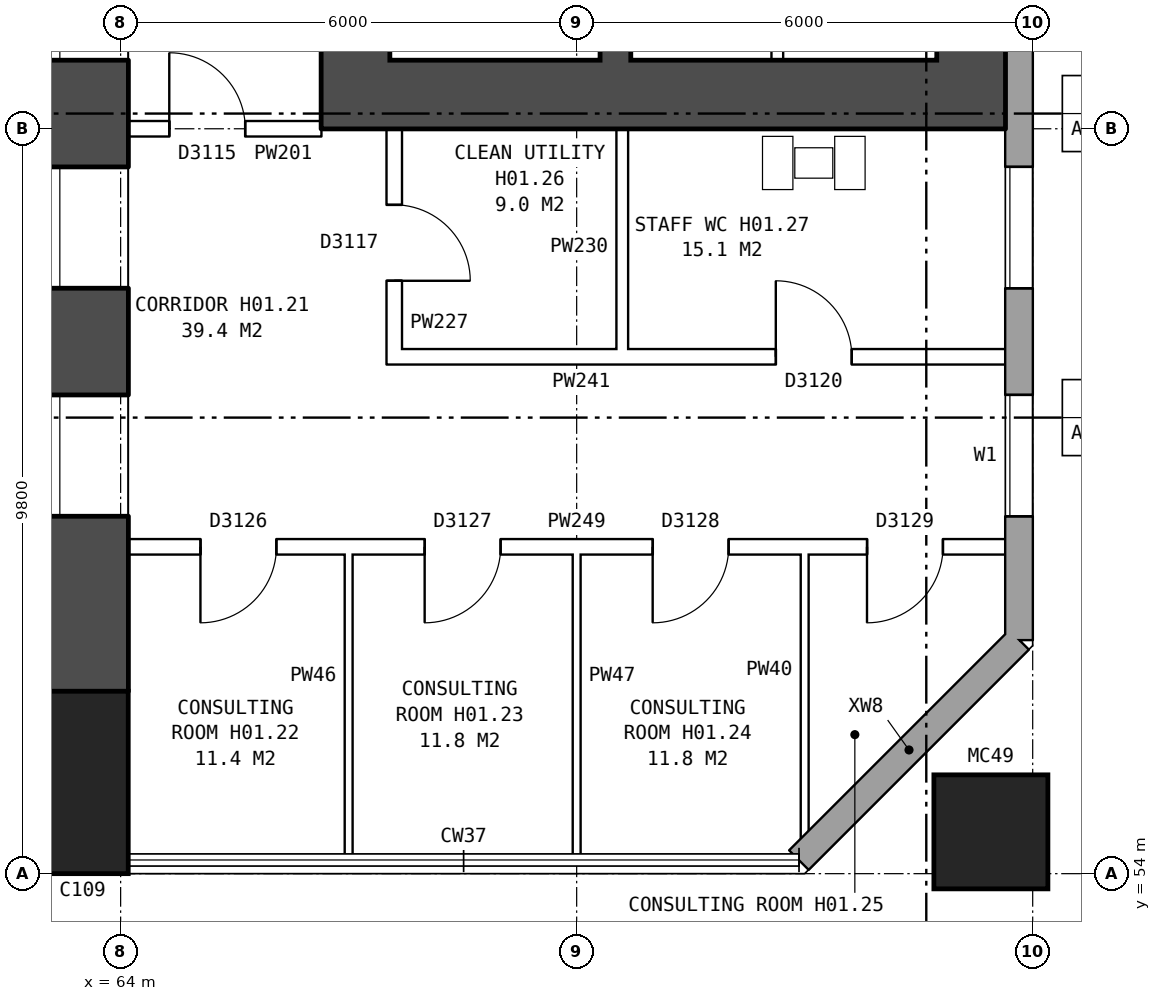
"""IFC4 building model, lengths in metres.
Left out: names, types, materials, properties, quantities, classifications, styles, units other than length and angle.
Written with IfcOpenShell. Run it as: python <this file> out.ifc"""

import sys

from ifc_helpers import new_model, si_unit, direction, frame, frame_2d, origin, origin_2d, place, context, subcontext, project, spatial, rectangle, hollow_rectangle, extrude, element, fill, save


model = new_model("IFC4")
c1 = context("Model", 3, precision=1e-05, world=origin(), true_north=direction((0.0, 1.0)))
c2 = subcontext(c1, "Body", "Model", "MODEL_VIEW")
j1 = project(units=[si_unit("LENGTHUNIT", "METRE"), si_unit("PLANEANGLEUNIT", "RADIAN")], contexts=[c1])
p1 = place(None, origin())
s1 = spatial("IfcSite", under=j1, at=p1, CompositionType="ELEMENT")
p2 = place(p1, origin())
s2 = spatial("IfcBuilding", under=s1, at=p2, CompositionType="ELEMENT")
p3 = place(p2, frame((0.0, 0.0, 5.5)))
s3 = spatial("IfcBuildingStorey", under=s2, at=p3, CompositionType="ELEMENT", Elevation=5.5)
p4 = place(p3, frame((63.5, 55.2, -0.3), z_axis=(0.0, 0.0, 1.0), x_axis=(1.0, 0.0, 0.0)))
e1 = element("IfcColumn", 1, at=p4, inside=s3, PredefinedType="COLUMN", context=c2, shape_type="SweptSolid", body=[
    extrude(rectangle(XDim=1.2, YDim=2.4, at=origin_2d()), origin(), (0.0, 0.0, 1.0), 4.6),
])
p5 = place(p3, frame((63.5, 56.4, -0.3), z_axis=(0.0, 0.0, 1.0), x_axis=(0.0, 1.0, 0.0)))
e2 = element("IfcWall", 2, at=p5, inside=s3, PredefinedType="SHEAR", context=c2, shape_type="SweptSolid", body=[
    extrude(rectangle(XDim=27.2, YDim=1.2, at=frame_2d((13.6, 0.0))), origin(), (0.0, 0.0, 1.0), 4.6),
])
p6 = place(p5, frame((2.3, 0.0, 0.8)))
e3 = element("IfcOpeningElement", 3, at=p6, cuts=e2, PredefinedType="OPENING", context=c2, shape_type="SweptSolid", body=[
    extrude(rectangle(XDim=1.6, YDim=1.8, at=frame_2d((0.8, 0.9))), frame((0.0, 0.61, 0.0), z_axis=(0.0, -1.0, 0.0), x_axis=(1.0, 0.0, 0.0)), (0.0, 0.0, 1.0), 1.22),
])
p7 = place(p5, frame((5.3, 0.0, 0.8)))
e4 = element("IfcOpeningElement", 4, at=p7, cuts=e2, PredefinedType="OPENING", context=c2, shape_type="SweptSolid", body=[
    extrude(rectangle(XDim=1.6, YDim=1.8, at=frame_2d((0.8, 0.9))), frame((0.0, 0.61, 0.0), z_axis=(0.0, -1.0, 0.0), x_axis=(1.0, 0.0, 0.0)), (0.0, 0.0, 1.0), 1.22),
])
p8 = place(p5, frame((8.3, 0.0, 0.8)))
e5 = element("IfcOpeningElement", 5, at=p8, cuts=e2, PredefinedType="OPENING", context=c2, shape_type="SweptSolid", body=[
    extrude(rectangle(XDim=1.6, YDim=1.8, at=frame_2d((0.8, 0.9))), frame((0.0, 0.61, 0.0), z_axis=(0.0, -1.0, 0.0), x_axis=(1.0, 0.0, 0.0)), (0.0, 0.0, 1.0), 1.22),
])
p9 = place(p5, frame((11.3, 0.0, 0.8)))
e6 = element("IfcOpeningElement", 6, at=p9, cuts=e2, PredefinedType="OPENING", context=c2, shape_type="SweptSolid", body=[
    extrude(rectangle(XDim=1.6, YDim=1.8, at=frame_2d((0.8, 0.9))), frame((0.0, 0.61, 0.0), z_axis=(0.0, -1.0, 0.0), x_axis=(1.0, 0.0, 0.0)), (0.0, 0.0, 1.0), 1.22),
])
p10 = place(p5, frame((14.3, 0.0, 0.8)))
e7 = element("IfcOpeningElement", 7, at=p10, cuts=e2, PredefinedType="OPENING", context=c2, shape_type="SweptSolid", body=[
    extrude(rectangle(XDim=1.6, YDim=1.8, at=frame_2d((0.8, 0.9))), frame((0.0, 0.61, 0.0), z_axis=(0.0, -1.0, 0.0), x_axis=(1.0, 0.0, 0.0)), (0.0, 0.0, 1.0), 1.22),
])
p11 = place(p5, frame((17.3, 0.0, 0.8)))
e8 = element("IfcOpeningElement", 8, at=p11, cuts=e2, PredefinedType="OPENING", context=c2, shape_type="SweptSolid", body=[
    extrude(rectangle(XDim=1.6, YDim=1.8, at=frame_2d((0.8, 0.9))), frame((0.0, 0.61, 0.0), z_axis=(0.0, -1.0, 0.0), x_axis=(1.0, 0.0, 0.0)), (0.0, 0.0, 1.0), 1.22),
])
p12 = place(p5, frame((20.3, 0.0, 0.8)))
e9 = element("IfcOpeningElement", 9, at=p12, cuts=e2, PredefinedType="OPENING", context=c2, shape_type="SweptSolid", body=[
    extrude(rectangle(XDim=1.6, YDim=1.8, at=frame_2d((0.8, 0.9))), frame((0.0, 0.61, 0.0), z_axis=(0.0, -1.0, 0.0), x_axis=(1.0, 0.0, 0.0)), (0.0, 0.0, 1.0), 1.22),
])
p13 = place(p5, frame((23.3, 0.0, 0.8)))
e10 = element("IfcOpeningElement", 10, at=p13, cuts=e2, PredefinedType="OPENING", context=c2, shape_type="SweptSolid", body=[
    extrude(rectangle(XDim=1.6, YDim=1.8, at=frame_2d((0.8, 0.9))), frame((0.0, 0.61, 0.0), z_axis=(0.0, -1.0, 0.0), x_axis=(1.0, 0.0, 0.0)), (0.0, 0.0, 1.0), 1.22),
])
p14 = place(p3, frame((75.45, 54.55, 0.0), z_axis=(0.0, 0.0, 1.0), x_axis=(1.0, 0.0, 0.0)))
e11 = element("IfcColumn", 11, at=p14, inside=s3, PredefinedType="COLUMN", context=c2, shape_type="SweptSolid", body=[
    extrude(hollow_rectangle(XDim=1.5, YDim=1.5, WallThickness=0.08, at=origin_2d()), origin(), (0.0, 0.0, 1.0), 4.6),
])
p15 = place(p3, frame((72.925, 54.18, 0.0), z_axis=(0.0, 0.0, 1.0), x_axis=(0.707106781187, 0.707106781187, 0.0)))
e12 = element("IfcWall", 12, at=p15, inside=s3, PredefinedType="STANDARD", context=c2, shape_type="SweptSolid", body=[
    extrude(rectangle(XDim=4.094, YDim=0.36, at=frame_2d((2.047, 0.0))), origin(), (0.0, 0.0, 1.0), 4.3),
])
p16 = place(p3, frame((75.82, 57.075, 0.0), z_axis=(0.0, 0.0, 1.0), x_axis=(0.0, 1.0, 0.0)))
e13 = element("IfcWall", 13, at=p16, inside=s3, PredefinedType="STANDARD", context=c2, shape_type="SweptSolid", body=[
    extrude(rectangle(XDim=25.851, YDim=0.36, at=frame_2d((12.925, 0.0))), origin(), (0.0, 0.0, 1.0), 4.3),
])
p17 = place(p16, frame((1.625, 0.0, 0.8)))
e14 = element("IfcOpeningElement", 14, at=p17, cuts=e13, PredefinedType="OPENING", context=c2, shape_type="SweptSolid", body=[
    extrude(rectangle(XDim=1.6, YDim=1.8, at=frame_2d((0.8, 0.9))), frame((0.0, 0.19, 0.0), z_axis=(0.0, -1.0, 0.0), x_axis=(1.0, 0.0, 0.0)), (0.0, 0.0, 1.0), 0.38),
])
p18 = place(p16, frame((4.625, 0.0, 0.8)))
e15 = element("IfcOpeningElement", 15, at=p18, cuts=e13, PredefinedType="OPENING", context=c2, shape_type="SweptSolid", body=[
    extrude(rectangle(XDim=1.6, YDim=1.8, at=frame_2d((0.8, 0.9))), frame((0.0, 0.19, 0.0), z_axis=(0.0, -1.0, 0.0), x_axis=(1.0, 0.0, 0.0)), (0.0, 0.0, 1.0), 0.38),
])
p19 = place(p16, frame((19.625, 0.0, 0.8)))
e16 = element("IfcOpeningElement", 16, at=p19, cuts=e13, PredefinedType="OPENING", context=c2, shape_type="SweptSolid", body=[
    extrude(rectangle(XDim=1.6, YDim=1.8, at=frame_2d((0.8, 0.9))), frame((0.0, 0.19, 0.0), z_axis=(0.0, -1.0, 0.0), x_axis=(1.0, 0.0, 0.0)), (0.0, 0.0, 1.0), 0.38),
])
p20 = place(p16, frame((22.625, 0.0, 0.8)))
e17 = element("IfcOpeningElement", 17, at=p20, cuts=e13, PredefinedType="OPENING", context=c2, shape_type="SweptSolid", body=[
    extrude(rectangle(XDim=1.6, YDim=1.8, at=frame_2d((0.8, 0.9))), frame((0.0, 0.19, 0.0), z_axis=(0.0, -1.0, 0.0), x_axis=(1.0, 0.0, 0.0)), (0.0, 0.0, 1.0), 0.38),
])
p21 = place(p3, frame((67.09, 64.7, 0.0), z_axis=(0.0, 0.0, 1.0), x_axis=(0.0, 1.0, 0.0)))
e18 = element("IfcWall", 18, at=p21, inside=s3, PredefinedType="SHEAR", context=c2, shape_type="SweptSolid", body=[
    extrude(rectangle(XDim=10.6, YDim=0.9, at=frame_2d((5.3, 0.0))), origin(), (0.0, 0.0, 1.0), 4.3),
])
p22 = place(p21, frame((0.425, 0.0, 0.0)))
e19 = element("IfcOpeningElement", 19, at=p22, cuts=e18, PredefinedType="OPENING", context=c2, shape_type="SweptSolid", body=[
    extrude(rectangle(XDim=1.1, YDim=2.1, at=frame_2d((0.55, 1.05))), frame((0.0, 0.46, 0.0), z_axis=(0.0, -1.0, 0.0), x_axis=(1.0, 0.0, 0.0)), (0.0, 0.0, 1.0), 0.92),
])
p23 = place(p21, frame((9.0, 0.0, 0.0)))
e20 = element("IfcOpeningElement", 20, at=p23, cuts=e18, PredefinedType="OPENING", context=c2, shape_type="SweptSolid", body=[
    extrude(rectangle(XDim=1.1, YDim=2.1, at=frame_2d((0.55, 1.05))), frame((0.0, 0.46, 0.0), z_axis=(0.0, -1.0, 0.0), x_axis=(1.0, 0.0, 0.0)), (0.0, 0.0, 1.0), 0.92),
])
p24 = place(p3, frame((75.19, 64.7, 0.0), z_axis=(0.0, 0.0, 1.0), x_axis=(0.0, 1.0, 0.0)))
e21 = element("IfcWall", 21, at=p24, inside=s3, PredefinedType="SHEAR", context=c2, shape_type="SweptSolid", body=[
    extrude(rectangle(XDim=10.6, YDim=0.9, at=frame_2d((5.3, 0.0))), origin(), (0.0, 0.0, 1.0), 4.3),
])
p25 = place(p3, frame((66.64, 64.25, 0.0), z_axis=(0.0, 0.0, 1.0), x_axis=(1.0, 0.0, 0.0)))
e22 = element("IfcWall", 22, at=p25, inside=s3, PredefinedType="SHEAR", context=c2, shape_type="SweptSolid", body=[
    extrude(rectangle(XDim=9.0, YDim=0.9, at=frame_2d((4.5, 0.0))), origin(), (0.0, 0.0, 1.0), 4.3),
])
p26 = place(p3, frame((70.51, 64.7, 0.0), z_axis=(0.0, 0.0, 1.0), x_axis=(0.0, 1.0, 0.0)))
e23 = element("IfcWall", 23, at=p26, inside=s3, PredefinedType="SHEAR", context=c2, shape_type="SweptSolid", body=[
    extrude(rectangle(XDim=1.95, YDim=0.4, at=frame_2d((0.975, 0.0))), origin(), (0.0, 0.0, 1.0), 4.3),
])
p27 = place(p3, frame((72.64, 64.7, 0.0), z_axis=(0.0, 0.0, 1.0), x_axis=(0.0, 1.0, 0.0)))
e24 = element("IfcWall", 24, at=p27, inside=s3, PredefinedType="PARTITIONING", context=c2, shape_type="SweptSolid", body=[
    extrude(rectangle(XDim=1.45, YDim=0.15, at=frame_2d((0.725, 0.0))), origin(), (0.0, 0.0, 1.0), 4.3),
])
p28 = place(p27, frame((0.3, 0.0, 0.0)))
e25 = element("IfcOpeningElement", 25, at=p28, cuts=e24, PredefinedType="OPENING", context=c2, shape_type="SweptSolid", body=[
    extrude(rectangle(XDim=0.85, YDim=2.1, at=frame_2d((0.425, 1.05))), frame((0.0, 0.085, 0.0), z_axis=(0.0, -1.0, 0.0), x_axis=(1.0, 0.0, 0.0)), (0.0, 0.0, 1.0), 0.17),
])
p29 = place(p3, frame((63.98, 58.3, 0.0), z_axis=(0.0, 0.0, 1.0), x_axis=(1.0, 0.0, 0.0)))
e26 = element("IfcWall", 26, at=p29, inside=s3, PredefinedType="PARTITIONING", context=c2, shape_type="SweptSolid", body=[
    extrude(rectangle(XDim=11.78, YDim=0.2, at=frame_2d((5.89, 0.0))), origin(), (0.0, 0.0, 1.0), 4.3),
])
p30 = place(p29, frame((1.07, 0.0, 0.0)))
e27 = element("IfcOpeningElement", 27, at=p30, cuts=e26, PredefinedType="OPENING", context=c2, shape_type="SweptSolid", body=[
    extrude(rectangle(XDim=1.0, YDim=2.1, at=frame_2d((0.5, 1.05))), frame((0.0, 0.11, 0.0), z_axis=(0.0, -1.0, 0.0), x_axis=(1.0, 0.0, 0.0)), (0.0, 0.0, 1.0), 0.22),
])
p31 = place(p29, frame((4.02, 0.0, 0.0)))
e28 = element("IfcOpeningElement", 28, at=p31, cuts=e26, PredefinedType="OPENING", context=c2, shape_type="SweptSolid", body=[
    extrude(rectangle(XDim=1.0, YDim=2.1, at=frame_2d((0.5, 1.05))), frame((0.0, 0.11, 0.0), z_axis=(0.0, -1.0, 0.0), x_axis=(1.0, 0.0, 0.0)), (0.0, 0.0, 1.0), 0.22),
])
p32 = place(p29, frame((7.02, 0.0, 0.0)))
e29 = element("IfcOpeningElement", 29, at=p32, cuts=e26, PredefinedType="OPENING", context=c2, shape_type="SweptSolid", body=[
    extrude(rectangle(XDim=1.0, YDim=2.1, at=frame_2d((0.5, 1.05))), frame((0.0, 0.11, 0.0), z_axis=(0.0, -1.0, 0.0), x_axis=(1.0, 0.0, 0.0)), (0.0, 0.0, 1.0), 0.22),
])
p33 = place(p29, frame((9.84, 0.0, 0.0)))
e30 = element("IfcOpeningElement", 30, at=p33, cuts=e26, PredefinedType="OPENING", context=c2, shape_type="SweptSolid", body=[
    extrude(rectangle(XDim=1.0, YDim=2.1, at=frame_2d((0.5, 1.05))), frame((0.0, 0.11, 0.0), z_axis=(0.0, -1.0, 0.0), x_axis=(1.0, 0.0, 0.0)), (0.0, 0.0, 1.0), 0.22),
])
p34 = place(p3, frame((67.5, 60.8, 0.0), z_axis=(0.0, 0.0, 1.0), x_axis=(1.0, 0.0, 0.0)))
e31 = element("IfcWall", 31, at=p34, inside=s3, PredefinedType="PARTITIONING", context=c2, shape_type="SweptSolid", body=[
    extrude(rectangle(XDim=8.26, YDim=0.2, at=frame_2d((4.13, 0.0))), origin(), (0.0, 0.0, 1.0), 4.3),
])
p35 = place(p34, frame((5.12, 0.0, 0.0)))
e32 = element("IfcOpeningElement", 32, at=p35, cuts=e31, PredefinedType="OPENING", context=c2, shape_type="SweptSolid", body=[
    extrude(rectangle(XDim=1.0, YDim=2.1, at=frame_2d((0.5, 1.05))), frame((0.0, 0.11, 0.0), z_axis=(0.0, -1.0, 0.0), x_axis=(1.0, 0.0, 0.0)), (0.0, 0.0, 1.0), 0.22),
])
p36 = place(p3, frame((64.1, 63.8, 0.0), z_axis=(0.0, 0.0, 1.0), x_axis=(1.0, 0.0, 0.0)))
e33 = element("IfcWall", 33, at=p36, inside=s3, PredefinedType="PARTITIONING", context=c2, shape_type="SweptSolid", body=[
    extrude(rectangle(XDim=2.54, YDim=0.2, at=frame_2d((1.27, 0.0))), origin(), (0.0, 0.0, 1.0), 4.3),
])
p37 = place(p36, frame((0.54, 0.0, 0.0)))
e34 = element("IfcOpeningElement", 34, at=p37, cuts=e33, PredefinedType="OPENING", context=c2, shape_type="SweptSolid", body=[
    extrude(rectangle(XDim=1.0, YDim=2.1, at=frame_2d((0.5, 1.05))), frame((0.0, 0.11, 0.0), z_axis=(0.0, -1.0, 0.0), x_axis=(1.0, 0.0, 0.0)), (0.0, 0.0, 1.0), 0.22),
])
p38 = place(p3, frame((67.0, 54.24, 0.0), z_axis=(0.0, 0.0, 1.0), x_axis=(0.0, 1.0, 0.0)))
e35 = element("IfcWall", 35, at=p38, inside=s3, PredefinedType="PARTITIONING", context=c2, shape_type="SweptSolid", body=[
    extrude(rectangle(XDim=4.16, YDim=0.1, at=frame_2d((2.08, 0.0))), origin(), (0.0, 0.0, 1.0), 4.3),
])
p39 = place(p3, frame((67.6, 60.7, 0.0), z_axis=(0.0, 0.0, 1.0), x_axis=(0.0, 1.0, 0.0)))
e36 = element("IfcWall", 36, at=p39, inside=s3, PredefinedType="PARTITIONING", context=c2, shape_type="SweptSolid", body=[
    extrude(rectangle(XDim=3.1, YDim=0.2, at=frame_2d((1.55, 0.0))), origin(), (0.0, 0.0, 1.0), 4.3),
])
p40 = place(p39, frame((1.1, 0.0, 0.0)))
e37 = element("IfcOpeningElement", 37, at=p40, cuts=e36, PredefinedType="OPENING", context=c2, shape_type="SweptSolid", body=[
    extrude(rectangle(XDim=1.0, YDim=2.1, at=frame_2d((0.5, 1.05))), frame((0.0, 0.11, 0.0), z_axis=(0.0, -1.0, 0.0), x_axis=(1.0, 0.0, 0.0)), (0.0, 0.0, 1.0), 0.22),
])
p41 = place(p3, frame((70.0, 54.24, 0.0), z_axis=(0.0, 0.0, 1.0), x_axis=(0.0, 1.0, 0.0)))
e38 = element("IfcWall", 38, at=p41, inside=s3, PredefinedType="PARTITIONING", context=c2, shape_type="SweptSolid", body=[
    extrude(rectangle(XDim=4.16, YDim=0.1, at=frame_2d((2.08, 0.0))), origin(), (0.0, 0.0, 1.0), 4.3),
])
p42 = place(p3, frame((70.6, 60.7, 0.0), z_axis=(0.0, 0.0, 1.0), x_axis=(0.0, 1.0, 0.0)))
e39 = element("IfcWall", 39, at=p42, inside=s3, PredefinedType="PLUMBINGWALL", context=c2, shape_type="SweptSolid", body=[
    extrude(rectangle(XDim=3.1, YDim=0.15, at=frame_2d((1.55, 0.0))), origin(), (0.0, 0.0, 1.0), 4.3),
])
p43 = place(p3, frame((73.0, 54.389, 0.0), z_axis=(0.0, 0.0, 1.0), x_axis=(0.0, 1.0, 0.0)))
e40 = element("IfcWall", 40, at=p43, inside=s3, PredefinedType="PARTITIONING", context=c2, shape_type="SweptSolid", body=[
    extrude(rectangle(XDim=4.011, YDim=0.1, at=frame_2d((2.005, 0.0))), origin(), (0.0, 0.0, 1.0), 4.3),
])
p44 = place(p17, origin())
e41 = element("IfcWindow", 41, at=p44, inside=s3, PartitioningType="SINGLE_PANEL", PredefinedType="WINDOW", context=c2, shape_type="SweptSolid", body=[
    extrude(rectangle(XDim=1.6, YDim=1.8, at=frame_2d((0.8, 0.9))), frame((0.0, 0.15, 0.0), z_axis=(0.0, -1.0, 0.0), x_axis=(1.0, 0.0, 0.0)), (0.0, 0.0, 1.0), 0.06),
])
fill(e14, e41)
p45 = place(p18, origin())
e42 = element("IfcWindow", 42, at=p45, inside=s3, PartitioningType="SINGLE_PANEL", PredefinedType="WINDOW", context=c2, shape_type="SweptSolid", body=[
    extrude(rectangle(XDim=1.6, YDim=1.8, at=frame_2d((0.8, 0.9))), frame((0.0, 0.15, 0.0), z_axis=(0.0, -1.0, 0.0), x_axis=(1.0, 0.0, 0.0)), (0.0, 0.0, 1.0), 0.06),
])
fill(e15, e42)
p46 = place(p6, origin())
e43 = element("IfcWindow", 43, at=p46, inside=s3, PartitioningType="SINGLE_PANEL", PredefinedType="WINDOW", context=c2, shape_type="SweptSolid", body=[
    extrude(rectangle(XDim=1.6, YDim=1.8, at=frame_2d((0.8, 0.9))), frame((0.0, 0.33, 0.0), z_axis=(0.0, -1.0, 0.0), x_axis=(1.0, 0.0, 0.0)), (0.0, 0.0, 1.0), 0.06),
])
fill(e3, e43)
p47 = place(p7, origin())
e44 = element("IfcWindow", 44, at=p47, inside=s3, PartitioningType="SINGLE_PANEL", PredefinedType="WINDOW", context=c2, shape_type="SweptSolid", body=[
    extrude(rectangle(XDim=1.6, YDim=1.8, at=frame_2d((0.8, 0.9))), frame((0.0, 0.33, 0.0), z_axis=(0.0, -1.0, 0.0), x_axis=(1.0, 0.0, 0.0)), (0.0, 0.0, 1.0), 0.06),
])
fill(e4, e44)
p48 = place(p8, origin())
e45 = element("IfcWindow", 45, at=p48, inside=s3, PartitioningType="SINGLE_PANEL", PredefinedType="WINDOW", context=c2, shape_type="SweptSolid", body=[
    extrude(rectangle(XDim=1.6, YDim=1.8, at=frame_2d((0.8, 0.9))), frame((0.0, 0.33, 0.0), z_axis=(0.0, -1.0, 0.0), x_axis=(1.0, 0.0, 0.0)), (0.0, 0.0, 1.0), 0.06),
])
fill(e5, e45)
p49 = place(p30, frame((1.0, 0.0, 0.0), z_axis=(0.0, 0.0, 1.0), x_axis=(-1.0, 0.0, 0.0)))
e46 = element("IfcDoor", 46, at=p49, inside=s3, OperationType="SINGLE_SWING_RIGHT", PredefinedType="DOOR", context=c2, shape_type="SweptSolid", body=[
    extrude(rectangle(XDim=1.0, YDim=2.1, at=frame_2d((0.5, 1.05))), frame((0.0, 0.025, 0.0), z_axis=(0.0, -1.0, 0.0), x_axis=(1.0, 0.0, 0.0)), (0.0, 0.0, 1.0), 0.05),
])
fill(e27, e46)
p50 = place(p31, frame((1.0, 0.0, 0.0), z_axis=(0.0, 0.0, 1.0), x_axis=(-1.0, 0.0, 0.0)))
e47 = element("IfcDoor", 47, at=p50, inside=s3, OperationType="SINGLE_SWING_RIGHT", PredefinedType="DOOR", context=c2, shape_type="SweptSolid", body=[
    extrude(rectangle(XDim=1.0, YDim=2.1, at=frame_2d((0.5, 1.05))), frame((0.0, 0.025, 0.0), z_axis=(0.0, -1.0, 0.0), x_axis=(1.0, 0.0, 0.0)), (0.0, 0.0, 1.0), 0.05),
])
fill(e28, e47)
p51 = place(p32, frame((1.0, 0.0, 0.0), z_axis=(0.0, 0.0, 1.0), x_axis=(-1.0, 0.0, 0.0)))
e48 = element("IfcDoor", 48, at=p51, inside=s3, OperationType="SINGLE_SWING_RIGHT", PredefinedType="DOOR", context=c2, shape_type="SweptSolid", body=[
    extrude(rectangle(XDim=1.0, YDim=2.1, at=frame_2d((0.5, 1.05))), frame((0.0, 0.025, 0.0), z_axis=(0.0, -1.0, 0.0), x_axis=(1.0, 0.0, 0.0)), (0.0, 0.0, 1.0), 0.05),
])
fill(e29, e48)
p52 = place(p33, frame((1.0, 0.0, 0.0), z_axis=(0.0, 0.0, 1.0), x_axis=(-1.0, 0.0, 0.0)))
e49 = element("IfcDoor", 49, at=p52, inside=s3, OperationType="SINGLE_SWING_RIGHT", PredefinedType="DOOR", context=c2, shape_type="SweptSolid", body=[
    extrude(rectangle(XDim=1.0, YDim=2.1, at=frame_2d((0.5, 1.05))), frame((0.0, 0.025, 0.0), z_axis=(0.0, -1.0, 0.0), x_axis=(1.0, 0.0, 0.0)), (0.0, 0.0, 1.0), 0.05),
])
fill(e30, e49)
p53 = place(p35, origin())
e50 = element("IfcDoor", 50, at=p53, inside=s3, OperationType="SINGLE_SWING_LEFT", PredefinedType="DOOR", context=c2, shape_type="SweptSolid", body=[
    extrude(rectangle(XDim=1.0, YDim=2.1, at=frame_2d((0.5, 1.05))), frame((0.0, 0.025, 0.0), z_axis=(0.0, -1.0, 0.0), x_axis=(1.0, 0.0, 0.0)), (0.0, 0.0, 1.0), 0.05),
])
fill(e32, e50)
p54 = place(p37, origin())
e51 = element("IfcDoor", 51, at=p54, inside=s3, OperationType="SINGLE_SWING_LEFT", PredefinedType="DOOR", context=c2, shape_type="SweptSolid", body=[
    extrude(rectangle(XDim=1.0, YDim=2.1, at=frame_2d((0.5, 1.05))), frame((0.0, 0.025, 0.0), z_axis=(0.0, -1.0, 0.0), x_axis=(1.0, 0.0, 0.0)), (0.0, 0.0, 1.0), 0.05),
])
fill(e34, e51)
p55 = place(p40, frame((1.0, 0.0, 0.0), z_axis=(0.0, 0.0, 1.0), x_axis=(-1.0, 0.0, 0.0)))
e52 = element("IfcDoor", 52, at=p55, inside=s3, OperationType="SINGLE_SWING_RIGHT", PredefinedType="DOOR", context=c2, shape_type="SweptSolid", body=[
    extrude(rectangle(XDim=1.0, YDim=2.1, at=frame_2d((0.5, 1.05))), frame((0.0, 0.025, 0.0), z_axis=(0.0, -1.0, 0.0), x_axis=(1.0, 0.0, 0.0)), (0.0, 0.0, 1.0), 0.05),
])
fill(e37, e52)
save(model, sys.argv[1])
